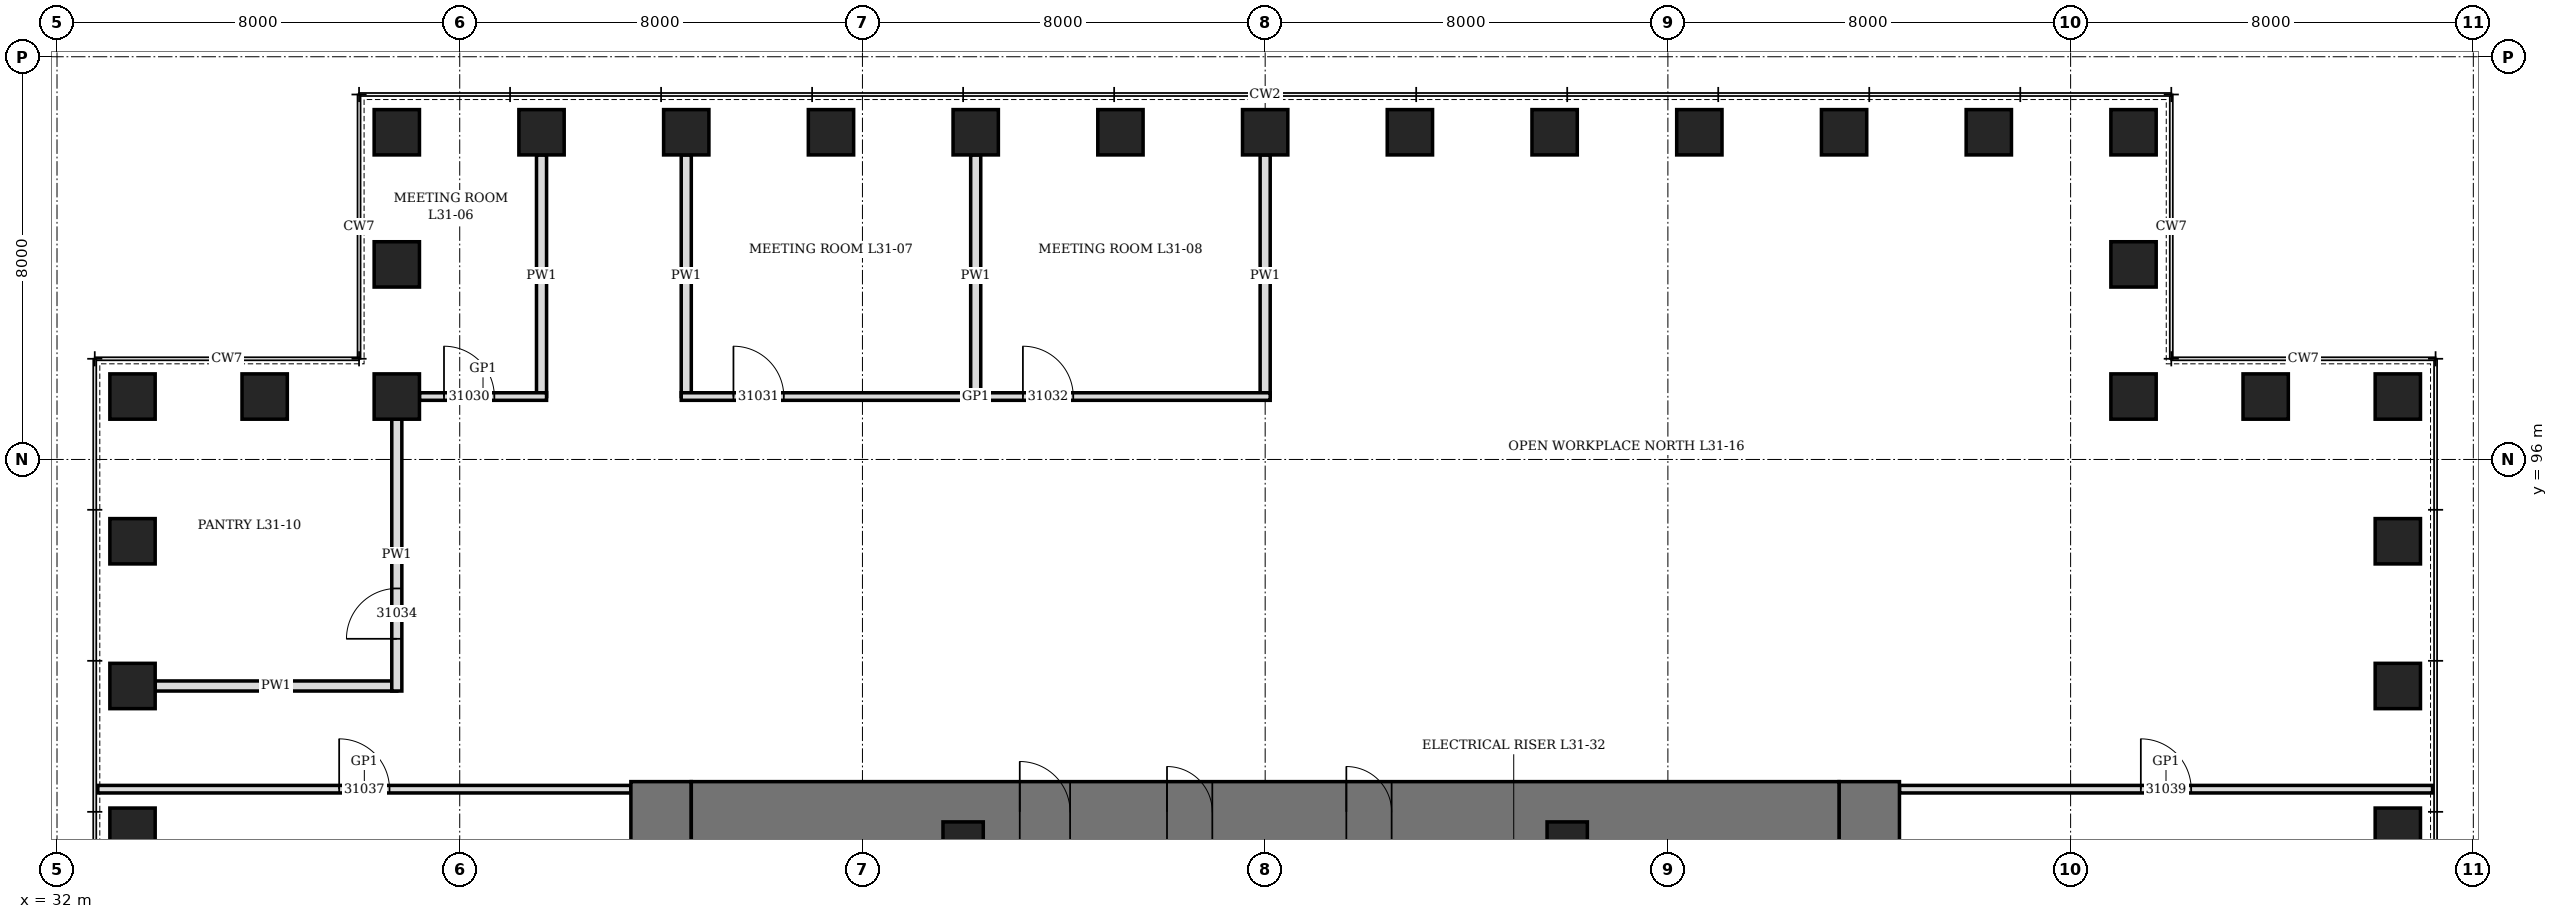
"""IFC4 building model, lengths in metres.
Left out: names, types, materials, properties, quantities, classifications, styles, units other than length and angle.
Written with IfcOpenShell. Run it as: python <this file> out.ifc"""

import sys

from ifc_helpers import new_model, si_unit, direction, frame, frame_2d, origin, origin_2d, place, context, subcontext, project, spatial, rectangle, hollow_rectangle, extrude, element, fill, save


model = new_model("IFC4")
c1 = context("Model", 3, precision=1e-05, world=origin(), true_north=direction((0.0, 1.0)))
c2 = subcontext(c1, "Body", "Model", "MODEL_VIEW")
j1 = project(units=[si_unit("LENGTHUNIT", "METRE"), si_unit("PLANEANGLEUNIT", "RADIAN")], contexts=[c1])
p1 = place(None, origin())
s1 = spatial("IfcSite", under=j1, at=p1, CompositionType="ELEMENT")
p2 = place(p1, origin())
s2 = spatial("IfcBuilding", under=s1, at=p2, CompositionType="ELEMENT")
p3 = place(p2, frame((0.0, 0.0, 141.7)))
s3 = spatial("IfcBuildingStorey", under=s2, at=p3, CompositionType="ELEMENT", Elevation=141.7)
for number, where, z_axis, x_axis in (
    (1, (78.5, 88.625, 0.0), (0.0, 0.0, 1.0), (0.0, 1.0, 0.0)),
    (2, (78.5, 91.5, 0.0), (0.0, 0.0, 1.0), (0.0, 1.0, 0.0)),
    (3, (78.5, 94.375, 0.0), (0.0, 0.0, 1.0), (0.0, 1.0, 0.0)),
    (4, (78.5, 97.25, 0.0), (0.0, 0.0, 1.0), (1.0, 0.0, 0.0)),
    (5, (75.875, 97.25, 0.0), (0.0, 0.0, 1.0), (1.0, 0.0, 0.0)),
    (6, (73.25, 97.25, 0.0), (0.0, 0.0, 1.0), (0.0, 1.0, 0.0)),
    (7, (73.25, 99.875, 0.0), (0.0, 0.0, 1.0), (0.0, 1.0, 0.0)),
    (8, (73.25, 102.5, 0.0), (0.0, 0.0, 1.0), (1.0, 0.0, 0.0)),
    (9, (70.375, 102.5, 0.0), (0.0, 0.0, 1.0), (1.0, 0.0, 0.0)),
    (10, (67.5, 102.5, 0.0), (0.0, 0.0, 1.0), (1.0, 0.0, 0.0)),
    (11, (64.625, 102.5, 0.0), (0.0, 0.0, 1.0), (1.0, 0.0, 0.0)),
    (12, (61.75, 102.5, 0.0), (0.0, 0.0, 1.0), (1.0, 0.0, 0.0)),
    (13, (58.875, 102.5, 0.0), (0.0, 0.0, 1.0), (1.0, 0.0, 0.0)),
    (14, (56.0, 102.5, 0.0), (0.0, 0.0, 1.0), (1.0, 0.0, 0.0)),
    (15, (53.125, 102.5, 0.0), (0.0, 0.0, 1.0), (1.0, 0.0, 0.0)),
    (16, (50.25, 102.5, 0.0), (0.0, 0.0, 1.0), (1.0, 0.0, 0.0)),
    (17, (47.375, 102.5, 0.0), (0.0, 0.0, 1.0), (1.0, 0.0, 0.0)),
    (18, (44.5, 102.5, 0.0), (0.0, 0.0, 1.0), (1.0, 0.0, 0.0)),
    (19, (41.625, 102.5, 0.0), (0.0, 0.0, 1.0), (1.0, 0.0, 0.0)),
    (20, (38.75, 102.5, 0.0), (0.0, 0.0, 1.0), (0.0, 1.0, 0.0)),
    (21, (38.75, 99.875, 0.0), (0.0, 0.0, 1.0), (0.0, 1.0, 0.0)),
    (22, (38.75, 97.25, 0.0), (0.0, 0.0, 1.0), (1.0, 0.0, 0.0)),
    (23, (36.125, 97.25, 0.0), (0.0, 0.0, 1.0), (1.0, 0.0, 0.0)),
    (24, (33.5, 97.25, 0.0), (0.0, 0.0, 1.0), (0.0, 1.0, 0.0)),
    (25, (33.5, 94.375, 0.0), (0.0, 0.0, 1.0), (0.0, 1.0, 0.0)),
    (26, (33.5, 91.5, 0.0), (0.0, 0.0, 1.0), (0.0, 1.0, 0.0)),
    (27, (33.5, 88.625, 0.0), (0.0, 0.0, 1.0), (0.0, 1.0, 0.0)),
):
    element("IfcColumn", number, at=place(p3, frame(where, z_axis=z_axis, x_axis=x_axis)), inside=s3, PredefinedType="COLUMN", context=c2, shape_type="SweptSolid", body=[
        extrude(hollow_rectangle(XDim=0.9, YDim=0.9, WallThickness=0.12, at=origin_2d()), origin(), (0.0, 0.0, 1.0), 4.2),
    ])
p4 = place(p3, frame((44.0, 70.4, 0.0), z_axis=(0.0, 0.0, 1.0), x_axis=(0.0, 1.0, 0.0)))
e28 = element("IfcWall", 28, at=p4, inside=s3, PredefinedType="SHEAR", context=c2, shape_type="SweptSolid", body=[
    extrude(rectangle(XDim=19.2, YDim=1.2, at=frame_2d((9.6, 0.0))), origin(), (0.0, 0.0, 1.0), 4.2),
])
p5 = place(p4, frame((8.6, 0.0, 0.0)))
e29 = element("IfcOpeningElement", 29, at=p5, cuts=e28, PredefinedType="OPENING", context=c2, shape_type="SweptSolid", body=[
    extrude(rectangle(XDim=2.0, YDim=2.4, at=frame_2d((1.0, 1.2))), frame((0.0, 0.61, 0.0), z_axis=(0.0, -1.0, 0.0), x_axis=(1.0, 0.0, 0.0)), (0.0, 0.0, 1.0), 1.22),
])
p6 = place(p3, frame((68.0, 70.4, 0.0), z_axis=(0.0, 0.0, 1.0), x_axis=(0.0, 1.0, 0.0)))
e30 = element("IfcWall", 30, at=p6, inside=s3, PredefinedType="SHEAR", context=c2, shape_type="SweptSolid", body=[
    extrude(rectangle(XDim=19.2, YDim=1.2, at=frame_2d((9.6, 0.0))), origin(), (0.0, 0.0, 1.0), 4.2),
])
p7 = place(p6, frame((8.6, 0.0, 0.0)))
e31 = element("IfcOpeningElement", 31, at=p7, cuts=e30, PredefinedType="OPENING", context=c2, shape_type="SweptSolid", body=[
    extrude(rectangle(XDim=2.0, YDim=2.4, at=frame_2d((1.0, 1.2))), frame((0.0, 0.61, 0.0), z_axis=(0.0, -1.0, 0.0), x_axis=(1.0, 0.0, 0.0)), (0.0, 0.0, 1.0), 1.22),
])
p8 = place(p3, frame((44.6, 89.0, 0.0), z_axis=(0.0, 0.0, 1.0), x_axis=(1.0, 0.0, 0.0)))
e32 = element("IfcWall", 32, at=p8, inside=s3, PredefinedType="SHEAR", context=c2, shape_type="SweptSolid", body=[
    extrude(rectangle(XDim=22.8, YDim=1.2, at=frame_2d((11.4, 0.0))), origin(), (0.0, 0.0, 1.0), 4.2),
])
p9 = place(p8, frame((6.525, 0.0, 0.0)))
e33 = element("IfcOpeningElement", 33, at=p9, cuts=e32, PredefinedType="OPENING", context=c2, shape_type="SweptSolid", body=[
    extrude(rectangle(XDim=1.0, YDim=2.1, at=frame_2d((0.5, 1.05))), frame((0.0, 0.61, 0.0), z_axis=(0.0, -1.0, 0.0), x_axis=(1.0, 0.0, 0.0)), (0.0, 0.0, 1.0), 1.22),
])
p10 = place(p8, frame((9.45, 0.0, 0.0)))
e34 = element("IfcOpeningElement", 34, at=p10, cuts=e32, PredefinedType="OPENING", context=c2, shape_type="SweptSolid", body=[
    extrude(rectangle(XDim=0.9, YDim=2.1, at=frame_2d((0.45, 1.05))), frame((0.0, 0.61, 0.0), z_axis=(0.0, -1.0, 0.0), x_axis=(1.0, 0.0, 0.0)), (0.0, 0.0, 1.0), 1.22),
])
p11 = place(p8, frame((13.012, 0.0, 0.0)))
e35 = element("IfcOpeningElement", 35, at=p11, cuts=e32, PredefinedType="OPENING", context=c2, shape_type="SweptSolid", body=[
    extrude(rectangle(XDim=0.9, YDim=2.1, at=frame_2d((0.45, 1.05))), frame((0.0, 0.61, 0.0), z_axis=(0.0, -1.0, 0.0), x_axis=(1.0, 0.0, 0.0)), (0.0, 0.0, 1.0), 1.22),
])
for number, where, z_axis, x_axis in (
    (36, (50.0, 88.4, 0.0), (0.0, 0.0, 1.0), (1.0, 0.0, 0.0)),
    (37, (62.0, 88.4, 0.0), (0.0, 0.0, 1.0), (1.0, 0.0, 0.0)),
):
    element("IfcColumn", number, at=place(p3, frame(where, z_axis=z_axis, x_axis=x_axis)), inside=s3, PredefinedType="COLUMN", context=c2, shape_type="SweptSolid", body=[
        extrude(hollow_rectangle(XDim=0.8, YDim=0.8, WallThickness=0.1, at=origin_2d()), origin(), (0.0, 0.0, 1.0), 4.2),
    ])
p12 = place(p3, frame((41.625, 97.25, 0.0), z_axis=(0.0, 0.0, 1.0), x_axis=(0.0, 1.0, 0.0)))
e38 = element("IfcWall", 38, at=p12, inside=s3, PredefinedType="PARTITIONING", context=c2, shape_type="SweptSolid", body=[
    extrude(rectangle(XDim=4.8, YDim=0.2, at=frame_2d((2.4, 0.0))), origin(), (0.0, 0.0, 1.0), 3.428),
])
p13 = place(p3, frame((44.5, 97.25, 0.0), z_axis=(0.0, 0.0, 1.0), x_axis=(0.0, 1.0, 0.0)))
e39 = element("IfcWall", 39, at=p13, inside=s3, PredefinedType="PARTITIONING", context=c2, shape_type="SweptSolid", body=[
    extrude(rectangle(XDim=4.8, YDim=0.2, at=frame_2d((2.4, 0.0))), origin(), (0.0, 0.0, 1.0), 2.74),
])
for number, where, z_axis, x_axis in (
    (40, (50.25, 97.25, 0.0), (0.0, 0.0, 1.0), (0.0, 1.0, 0.0)),
    (41, (56.0, 97.25, 0.0), (0.0, 0.0, 1.0), (0.0, 1.0, 0.0)),
):
    element("IfcWall", number, at=place(p3, frame(where, z_axis=z_axis, x_axis=x_axis)), inside=s3, PredefinedType="PARTITIONING", context=c2, shape_type="SweptSolid", body=[
        extrude(rectangle(XDim=4.8, YDim=0.2, at=frame_2d((2.4, 0.0))), origin(), (0.0, 0.0, 1.0), 3.278),
    ])
p14 = place(p3, frame((33.95, 91.5, 0.0), z_axis=(0.0, 0.0, 1.0), x_axis=(1.0, 0.0, 0.0)))
e42 = element("IfcWall", 42, at=p14, inside=s3, PredefinedType="PARTITIONING", context=c2, shape_type="SweptSolid", body=[
    extrude(rectangle(XDim=4.8, YDim=0.2, at=frame_2d((2.4, 0.0))), origin(), (0.0, 0.0, 1.0), 3.428),
])
p15 = place(p3, frame((32.81, 89.45, 0.0), z_axis=(0.0, 0.0, 1.0), x_axis=(1.0, 0.0, 0.0)))
e43 = element("IfcWall", 43, at=p15, inside=s3, PredefinedType="PARTITIONING", context=c2, shape_type="SweptSolid", body=[
    extrude(rectangle(XDim=10.59, YDim=0.15, at=frame_2d((5.295, 0.0))), origin(), (0.0, 0.0, 1.0), 4.04),
])
p16 = place(p15, frame((4.795, 0.0, 0.0)))
e44 = element("IfcOpeningElement", 44, at=p16, cuts=e43, PredefinedType="OPENING", context=c2, shape_type="SweptSolid", body=[
    extrude(rectangle(XDim=1.0, YDim=2.4, at=frame_2d((0.5, 1.2))), frame((0.0, 0.085, 0.0), z_axis=(0.0, -1.0, 0.0), x_axis=(1.0, 0.0, 0.0)), (0.0, 0.0, 1.0), 0.17),
])
p17 = place(p3, frame((68.6, 89.45, 0.0), z_axis=(0.0, 0.0, 1.0), x_axis=(1.0, 0.0, 0.0)))
e45 = element("IfcWall", 45, at=p17, inside=s3, PredefinedType="PARTITIONING", context=c2, shape_type="SweptSolid", body=[
    extrude(rectangle(XDim=10.59, YDim=0.15, at=frame_2d((5.295, 0.0))), origin(), (0.0, 0.0, 1.0), 4.04),
])
p18 = place(p17, frame((4.795, 0.0, 0.0)))
e46 = element("IfcOpeningElement", 46, at=p18, cuts=e45, PredefinedType="OPENING", context=c2, shape_type="SweptSolid", body=[
    extrude(rectangle(XDim=1.0, YDim=2.4, at=frame_2d((0.5, 1.2))), frame((0.0, 0.085, 0.0), z_axis=(0.0, -1.0, 0.0), x_axis=(1.0, 0.0, 0.0)), (0.0, 0.0, 1.0), 0.17),
])
p19 = place(p3, frame((39.2, 97.25, 0.0), z_axis=(0.0, 0.0, 1.0), x_axis=(1.0, 0.0, 0.0)))
e47 = element("IfcWall", 47, at=p19, inside=s3, PredefinedType="PARTITIONING", context=c2, shape_type="SweptSolid", body=[
    extrude(rectangle(XDim=2.525, YDim=0.15, at=frame_2d((1.263, 0.0))), origin(), (0.0, 0.0, 1.0), 4.04),
])
p20 = place(p19, frame((0.488, 0.0, 0.0)))
e48 = element("IfcOpeningElement", 48, at=p20, cuts=e47, PredefinedType="OPENING", context=c2, shape_type="SweptSolid", body=[
    extrude(rectangle(XDim=1.0, YDim=2.4, at=frame_2d((0.5, 1.2))), frame((0.0, 0.085, 0.0), z_axis=(0.0, -1.0, 0.0), x_axis=(1.0, 0.0, 0.0)), (0.0, 0.0, 1.0), 0.17),
])
p21 = place(p3, frame((44.4, 97.25, 0.0), z_axis=(0.0, 0.0, 1.0), x_axis=(1.0, 0.0, 0.0)))
e49 = element("IfcWall", 49, at=p21, inside=s3, PredefinedType="PARTITIONING", context=c2, shape_type="SweptSolid", body=[
    extrude(rectangle(XDim=11.7, YDim=0.15, at=frame_2d((5.85, 0.0))), origin(), (0.0, 0.0, 1.0), 4.04),
])
p22 = place(p21, frame((1.038, 0.0, 0.0)))
e50 = element("IfcOpeningElement", 50, at=p22, cuts=e49, PredefinedType="OPENING", context=c2, shape_type="SweptSolid", body=[
    extrude(rectangle(XDim=1.0, YDim=2.4, at=frame_2d((0.5, 1.2))), frame((0.0, 0.085, 0.0), z_axis=(0.0, -1.0, 0.0), x_axis=(1.0, 0.0, 0.0)), (0.0, 0.0, 1.0), 0.17),
])
p23 = place(p21, frame((6.788, 0.0, 0.0)))
e51 = element("IfcOpeningElement", 51, at=p23, cuts=e49, PredefinedType="OPENING", context=c2, shape_type="SweptSolid", body=[
    extrude(rectangle(XDim=1.0, YDim=2.4, at=frame_2d((0.5, 1.2))), frame((0.0, 0.085, 0.0), z_axis=(0.0, -1.0, 0.0), x_axis=(1.0, 0.0, 0.0)), (0.0, 0.0, 1.0), 0.17),
])
p24 = place(p3, frame((38.75, 91.4, 0.0), z_axis=(0.0, 0.0, 1.0), x_axis=(0.0, 1.0, 0.0)))
e52 = element("IfcWall", 52, at=p24, inside=s3, PredefinedType="PARTITIONING", context=c2, shape_type="SweptSolid", body=[
    extrude(rectangle(XDim=5.4, YDim=0.2, at=frame_2d((2.7, 0.0))), origin(), (0.0, 0.0, 1.0), 4.04),
])
p25 = place(p24, frame((1.038, 0.0, 0.0)))
e53 = element("IfcOpeningElement", 53, at=p25, cuts=e52, PredefinedType="OPENING", context=c2, shape_type="SweptSolid", body=[
    extrude(rectangle(XDim=1.0, YDim=2.1, at=frame_2d((0.5, 1.05))), frame((0.0, 0.11, 0.0), z_axis=(0.0, -1.0, 0.0), x_axis=(1.0, 0.0, 0.0)), (0.0, 0.0, 1.0), 0.22),
])
p26 = place(p9, origin())
e54 = element("IfcDoor", 54, at=p26, inside=s3, OperationType="SINGLE_SWING_LEFT", PredefinedType="DOOR", context=c2, shape_type="SweptSolid", body=[
    extrude(rectangle(XDim=1.0, YDim=2.1, at=frame_2d((0.5, 1.05))), frame((0.0, 0.35, 0.0), z_axis=(0.0, -1.0, 0.0), x_axis=(1.0, 0.0, 0.0)), (0.0, 0.0, 1.0), 0.7),
])
fill(e33, e54)
p27 = place(p10, origin())
e55 = element("IfcDoor", 55, at=p27, inside=s3, OperationType="SINGLE_SWING_LEFT", PredefinedType="DOOR", context=c2, shape_type="SweptSolid", body=[
    extrude(rectangle(XDim=0.9, YDim=2.1, at=frame_2d((0.45, 1.05))), frame((0.0, 0.35, 0.0), z_axis=(0.0, -1.0, 0.0), x_axis=(1.0, 0.0, 0.0)), (0.0, 0.0, 1.0), 0.7),
])
fill(e34, e55)
p28 = place(p11, origin())
e56 = element("IfcDoor", 56, at=p28, inside=s3, OperationType="SINGLE_SWING_LEFT", PredefinedType="DOOR", context=c2, shape_type="SweptSolid", body=[
    extrude(rectangle(XDim=0.9, YDim=2.1, at=frame_2d((0.45, 1.05))), frame((0.0, 0.35, 0.0), z_axis=(0.0, -1.0, 0.0), x_axis=(1.0, 0.0, 0.0)), (0.0, 0.0, 1.0), 0.7),
])
fill(e35, e56)
p29 = place(p20, origin())
e57 = element("IfcDoor", 57, at=p29, inside=s3, OperationType="SINGLE_SWING_RIGHT", PredefinedType="DOOR", context=c2, shape_type="SweptSolid", body=[
    extrude(rectangle(XDim=1.0, YDim=2.4, at=frame_2d((0.5, 1.2))), frame((0.0, 0.075, 0.0), z_axis=(0.0, -1.0, 0.0), x_axis=(1.0, 0.0, 0.0)), (0.0, 0.0, 1.0), 0.149),
])
fill(e48, e57)
p30 = place(p22, origin())
e58 = element("IfcDoor", 58, at=p30, inside=s3, OperationType="SINGLE_SWING_RIGHT", PredefinedType="DOOR", context=c2, shape_type="SweptSolid", body=[
    extrude(rectangle(XDim=1.0, YDim=2.4, at=frame_2d((0.5, 1.2))), frame((0.0, 0.075, 0.0), z_axis=(0.0, -1.0, 0.0), x_axis=(1.0, 0.0, 0.0)), (0.0, 0.0, 1.0), 0.149),
])
fill(e50, e58)
p31 = place(p23, origin())
e59 = element("IfcDoor", 59, at=p31, inside=s3, OperationType="SINGLE_SWING_RIGHT", PredefinedType="DOOR", context=c2, shape_type="SweptSolid", body=[
    extrude(rectangle(XDim=1.0, YDim=2.4, at=frame_2d((0.5, 1.2))), frame((0.0, 0.075, 0.0), z_axis=(0.0, -1.0, 0.0), x_axis=(1.0, 0.0, 0.0)), (0.0, 0.0, 1.0), 0.149),
])
fill(e51, e59)
p32 = place(p25, origin())
e60 = element("IfcDoor", 60, at=p32, inside=s3, OperationType="SINGLE_SWING_LEFT", PredefinedType="DOOR", context=c2, shape_type="SweptSolid", body=[
    extrude(rectangle(XDim=1.0, YDim=2.1, at=frame_2d((0.5, 1.05))), frame((0.0, 0.1, 0.0), z_axis=(0.0, -1.0, 0.0), x_axis=(1.0, 0.0, 0.0)), (0.0, 0.0, 1.0), 0.199),
])
fill(e53, e60)
p33 = place(p16, origin())
e61 = element("IfcDoor", 61, at=p33, inside=s3, OperationType="SINGLE_SWING_RIGHT", PredefinedType="DOOR", context=c2, shape_type="SweptSolid", body=[
    extrude(rectangle(XDim=1.0, YDim=2.4, at=frame_2d((0.5, 1.2))), frame((0.0, 0.075, 0.0), z_axis=(0.0, -1.0, 0.0), x_axis=(1.0, 0.0, 0.0)), (0.0, 0.0, 1.0), 0.149),
])
fill(e44, e61)
p34 = place(p18, origin())
e62 = element("IfcDoor", 62, at=p34, inside=s3, OperationType="SINGLE_SWING_RIGHT", PredefinedType="DOOR", context=c2, shape_type="SweptSolid", body=[
    extrude(rectangle(XDim=1.0, YDim=2.4, at=frame_2d((0.5, 1.2))), frame((0.0, 0.075, 0.0), z_axis=(0.0, -1.0, 0.0), x_axis=(1.0, 0.0, 0.0)), (0.0, 0.0, 1.0), 0.149),
])
fill(e46, e62)
save(model, sys.argv[1])
